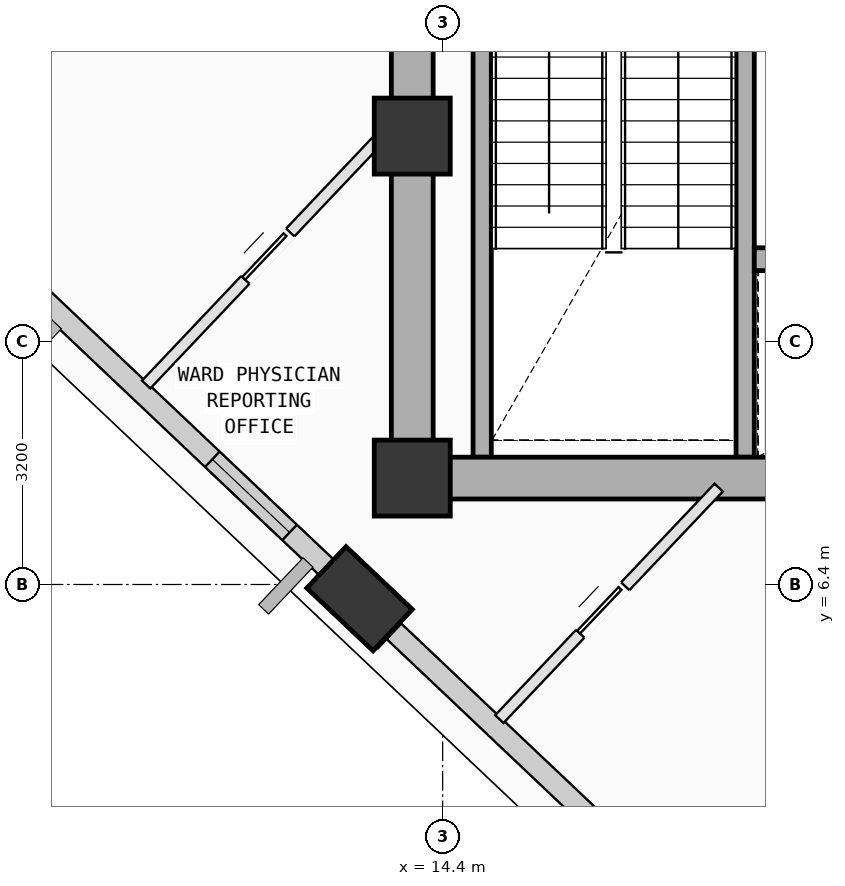
"""IFC4 building model, lengths in metres.
Left out: names, types, materials, properties, quantities, classifications, styles, units other than length and angle.
Written with IfcOpenShell. Run it as: python <this file> out.ifc"""

import sys

from ifc_helpers import new_model, si_unit, direction, frame, frame_2d, origin, origin_2d, place, context, subcontext, project, spatial, rectangle, extrude, element, fill, save


model = new_model("IFC4")
c1 = context("Model", 3, precision=1e-05, world=origin(), true_north=direction((0.0, 1.0)))
c2 = subcontext(c1, "Body", "Model", "MODEL_VIEW")
j1 = project(units=[si_unit("LENGTHUNIT", "METRE"), si_unit("PLANEANGLEUNIT", "RADIAN")], contexts=[c1])
p1 = place(None, origin())
s1 = spatial("IfcSite", under=j1, at=p1, CompositionType="ELEMENT")
p2 = place(p1, origin())
s2 = spatial("IfcBuilding", under=s1, at=p2, CompositionType="ELEMENT")
p3 = place(p2, frame((0.0, 0.0, 223.2)))
s3 = spatial("IfcBuildingStorey", under=s2, at=p3, CompositionType="ELEMENT", Elevation=223.2)
for number, where, z_axis, x_axis in (
    (1, (14.0, 7.8, 0.0), (0.0, 0.0, 1.0), (1.0, 0.0, 0.0)),
    (2, (14.0, 12.3, 0.0), (0.0, 0.0, 1.0), (1.0, 0.0, 0.0)),
):
    element("IfcColumn", number, at=place(p3, frame(where, z_axis=z_axis, x_axis=x_axis)), inside=s3, PredefinedType="COLUMN", context=c2, shape_type="SweptSolid", body=[
        extrude(rectangle(XDim=1.0, YDim=1.0, at=origin_2d()), origin(), (0.0, 0.0, 1.0), 4.0),
    ])
p4 = place(p3, frame((8.479, 10.786, 0.002), z_axis=(0.058538433581, -0.102882055288, 0.992969553659), x_axis=(-0.968698482416, 0.23451306813, 0.081405595887)))
e3 = element("IfcColumn", 3, at=p4, inside=s3, PredefinedType="COLUMN", context=c2, shape_type="SweptSolid", body=[
    extrude(rectangle(XDim=1.2, YDim=0.75, at=origin_2d()), origin(), (0.0, 0.0, 1.0), 4.025),
])
p5 = place(p3, frame((13.307, 6.213, 0.002), z_axis=(0.077207538593, -0.082913127137, 0.99356147738), x_axis=(-0.99694579508, 0.005324762158, 0.07791488035)))
e4 = element("IfcColumn", 4, at=p5, inside=s3, PredefinedType="COLUMN", context=c2, shape_type="SweptSolid", body=[
    extrude(rectangle(XDim=1.2, YDim=0.75, at=origin_2d()), origin(), (0.0, 0.0, 1.0), 4.022),
])
p6 = place(p3, frame((13.183, 6.33, 0.0), z_axis=(0.0, 0.0, 1.0), x_axis=(-0.725968007999, 0.687728472118, 0.0)))
e5 = element("IfcWall", 5, at=p6, inside=s3, PredefinedType="SOLIDWALL", context=c2, shape_type="SweptSolid", body=[
    extrude(rectangle(XDim=5.861, YDim=0.28, at=frame_2d((2.931, 0.0))), origin(), (0.0, 0.0, 1.0), 3.265),
])
p7 = place(p6, frame((1.098, 0.0, 0.75)))
e6 = element("IfcOpeningElement", 6, at=p7, cuts=e5, PredefinedType="OPENING", context=c2, shape_type="SweptSolid", body=[
    extrude(rectangle(XDim=1.4, YDim=1.85, at=frame_2d((0.7, 0.925))), frame((0.0, 0.15, 0.0), z_axis=(0.0, -1.0, 0.0), x_axis=(1.0, 0.0, 0.0)), (0.0, 0.0, 1.0), 0.3),
])
p8 = place(p3, frame((19.247, 0.585, 0.0), z_axis=(0.0, 0.0, 1.0), x_axis=(-0.725985785172, 0.687709706002, 0.0)))
e7 = element("IfcWall", 7, at=p8, inside=s3, PredefinedType="SOLIDWALL", context=c2, shape_type="SweptSolid", body=[
    extrude(rectangle(XDim=7.558, YDim=0.28, at=frame_2d((3.779, 0.0))), origin(), (0.0, 0.0, 1.0), 3.265),
])
p9 = place(p8, frame((1.875, 0.0, 0.75)))
e8 = element("IfcOpeningElement", 8, at=p9, cuts=e7, PredefinedType="OPENING", context=c2, shape_type="SweptSolid", body=[
    extrude(rectangle(XDim=1.8, YDim=2.05, at=frame_2d((0.9, 1.025))), frame((0.0, 0.15, 0.0), z_axis=(0.0, -1.0, 0.0), x_axis=(1.0, 0.0, 0.0)), (0.0, 0.0, 1.0), 0.3),
])
for number, where, z_axis, x_axis in (
    (9, (18.38, 15.12, 0.0), (0.0, 0.0, 1.0), (0.0, -1.0, 0.0)),
    (10, (14.92, 8.075, 0.0), (0.0, 0.0, 1.0), (0.0, 1.0, 0.0)),
):
    element("IfcWall", number, at=place(p3, frame(where, z_axis=z_axis, x_axis=x_axis)), inside=s3, PredefinedType="SOLIDWALL", context=c2, shape_type="SweptSolid", body=[
        extrude(rectangle(XDim=7.045, YDim=0.24, at=frame_2d((3.522, 0.0))), origin(), (0.0, 0.0, 1.0), 3.78),
    ])
p10 = place(p3, frame((14.0, 7.8, 0.0), z_axis=(0.0, 0.0, 1.0), x_axis=(1.0, 0.0, 0.0)))
e11 = element("IfcWall", 11, at=p10, inside=s3, PredefinedType="SHEAR", context=c2, shape_type="SweptSolid", body=[
    extrude(rectangle(XDim=10.8, YDim=0.55, at=frame_2d((5.4, 0.0))), origin(), (0.0, 0.0, 1.0), 3.78),
])
p11 = place(p3, frame((14.0, 16.8, 0.0), z_axis=(0.0, 0.0, 1.0), x_axis=(0.0, -1.0, 0.0)))
e12 = element("IfcWall", 12, at=p11, inside=s3, PredefinedType="SHEAR", context=c2, shape_type="SweptSolid", body=[
    extrude(rectangle(XDim=9.0, YDim=0.55, at=frame_2d((4.5, 0.0))), origin(), (0.0, 0.0, 1.0), 3.78),
])
p12 = place(p3, frame((18.5, 10.68, 0.0), z_axis=(0.0, 0.0, 1.0), x_axis=(1.0, 0.0, 0.0)))
e13 = element("IfcWall", 13, at=p12, inside=s3, PredefinedType="SOLIDWALL", context=c2, shape_type="SweptSolid", body=[
    extrude(rectangle(XDim=5.3, YDim=0.3, at=frame_2d((2.65, 0.0))), origin(), (0.0, 0.0, 1.0), 3.78),
])
p13 = place(p12, frame((4.22, 0.0, 0.0)))
e14 = element("IfcOpeningElement", 14, at=p13, cuts=e13, PredefinedType="OPENING", context=c2, shape_type="SweptSolid", body=[
    extrude(rectangle(XDim=0.86, YDim=2.06, at=frame_2d((0.43, 1.03))), frame((0.0, 0.16, 0.0), z_axis=(0.0, -1.0, 0.0), x_axis=(1.0, 0.0, 0.0)), (0.0, 0.0, 1.0), 0.32),
])
p14 = place(p12, frame((0.425, 0.0, 0.0)))
e15 = element("IfcOpeningElement", 15, at=p14, cuts=e13, PredefinedType="OPENING", context=c2, shape_type="SweptSolid", body=[
    extrude(rectangle(XDim=1.25, YDim=2.18, at=frame_2d((0.625, 1.09))), frame((0.0, 0.16, 0.0), z_axis=(0.0, -1.0, 0.0), x_axis=(1.0, 0.0, 0.0)), (0.0, 0.0, 1.0), 0.32),
])
p15 = place(p12, frame((2.525, 0.0, 0.0)))
e16 = element("IfcOpeningElement", 16, at=p15, cuts=e13, PredefinedType="OPENING", context=c2, shape_type="SweptSolid", body=[
    extrude(rectangle(XDim=1.25, YDim=2.18, at=frame_2d((0.625, 1.09))), frame((0.0, 0.16, 0.0), z_axis=(0.0, -1.0, 0.0), x_axis=(1.0, 0.0, 0.0)), (0.0, 0.0, 1.0), 0.32),
])
p16 = place(p3, frame((15.146, 4.629, 0.0), z_axis=(0.0, 0.0, 1.0), x_axis=(0.687765627003, 0.725932808401, 0.0)))
e17 = element("IfcWall", 17, at=p16, inside=s3, PredefinedType="PARTITIONING", context=c2, shape_type="SweptSolid", body=[
    extrude(rectangle(XDim=4.196, YDim=0.15, at=frame_2d((2.098, 0.0))), origin(), (0.0, 0.0, 1.0), 3.78),
])
p17 = place(p16, frame((1.547, 0.0, 0.0)))
e18 = element("IfcOpeningElement", 18, at=p17, cuts=e17, PredefinedType="OPENING", context=c2, shape_type="SweptSolid", body=[
    extrude(rectangle(XDim=0.86, YDim=2.06, at=frame_2d((0.43, 1.03))), frame((0.0, 0.085, 0.0), z_axis=(0.0, -1.0, 0.0), x_axis=(1.0, 0.0, 0.0)), (0.0, 0.0, 1.0), 0.17),
])
p18 = place(p3, frame((13.602, 5.616, 0.0), z_axis=(0.0, 0.0, 1.0), x_axis=(-0.725734838311, 0.68797452312, 0.0)))
e19 = element("IfcWall", 19, at=p18, inside=s3, PredefinedType="PARTITIONING", context=c2, shape_type="SweptSolid", body=[
    extrude(rectangle(XDim=0.795, YDim=0.15, at=frame_2d((0.397, 0.0))), origin(), (0.0, 0.0, 1.0), 3.265),
])
p19 = place(p3, frame((10.499, 9.031, 0.0), z_axis=(0.0, 0.0, 1.0), x_axis=(0.687833407474, 0.725868585601, 0.0)))
e20 = element("IfcWall", 20, at=p19, inside=s3, PredefinedType="PARTITIONING", context=c2, shape_type="SweptSolid", body=[
    extrude(rectangle(XDim=4.654, YDim=0.15, at=frame_2d((2.327, 0.0))), origin(), (0.0, 0.0, 1.0), 3.78),
])
p20 = place(p19, frame((1.897, 0.0, 0.0)))
e21 = element("IfcOpeningElement", 21, at=p20, cuts=e20, PredefinedType="OPENING", context=c2, shape_type="SweptSolid", body=[
    extrude(rectangle(XDim=0.86, YDim=2.06, at=frame_2d((0.43, 1.03))), frame((0.0, 0.085, 0.0), z_axis=(0.0, -1.0, 0.0), x_axis=(1.0, 0.0, 0.0)), (0.0, 0.0, 1.0), 0.17),
])
p21 = place(p7, origin())
e22 = element("IfcWindow", 22, at=p21, inside=s3, PartitioningType="SINGLE_PANEL", PredefinedType="WINDOW", context=c2, shape_type="SweptSolid", body=[
    extrude(rectangle(XDim=1.4, YDim=1.85, at=frame_2d((0.7, 0.925))), frame((0.0, 0.03, 0.0), z_axis=(0.0, -1.0, 0.0), x_axis=(1.0, 0.0, 0.0)), (0.0, 0.0, 1.0), 0.06),
])
fill(e6, e22)
p22 = place(p20, origin())
e23 = element("IfcDoor", 23, at=p22, inside=s3, OperationType="SLIDING_TO_LEFT", PredefinedType="DOOR", context=c2, shape_type="SweptSolid", body=[
    extrude(rectangle(XDim=0.86, YDim=2.06, at=frame_2d((0.43, 1.03))), frame((0.0, 0.025, 0.0), z_axis=(0.0, -1.0, 0.0), x_axis=(1.0, 0.0, 0.0)), (0.0, 0.0, 1.0), 0.05),
])
fill(e21, e23)
p23 = place(p17, origin())
e24 = element("IfcDoor", 24, at=p23, inside=s3, OperationType="SLIDING_TO_LEFT", PredefinedType="DOOR", context=c2, shape_type="SweptSolid", body=[
    extrude(rectangle(XDim=0.86, YDim=2.06, at=frame_2d((0.43, 1.03))), frame((0.0, 0.025, 0.0), z_axis=(0.0, -1.0, 0.0), x_axis=(1.0, 0.0, 0.0)), (0.0, 0.0, 1.0), 0.05),
])
fill(e18, e24)
save(model, sys.argv[1])
